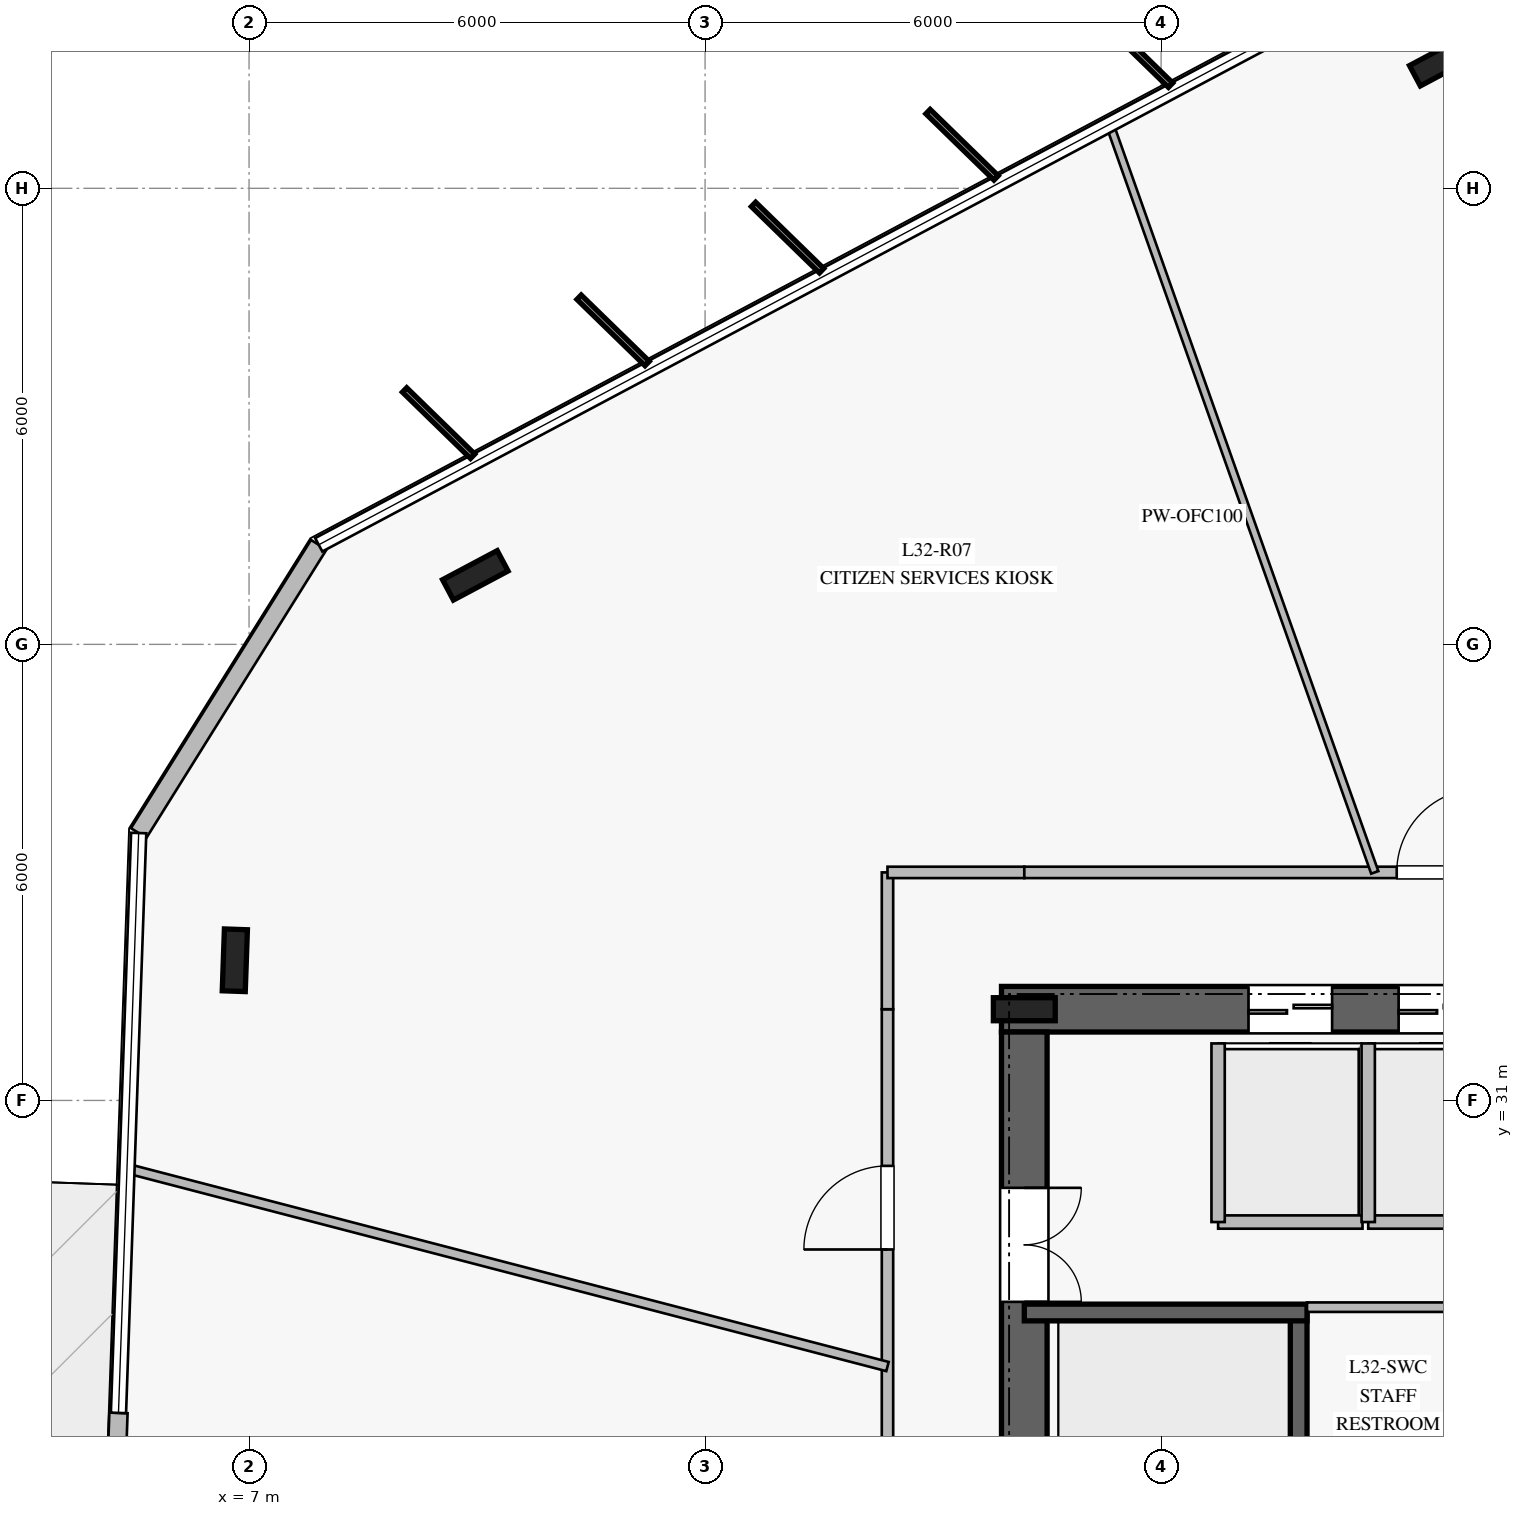
"""IFC4 building model, lengths in metres.
Left out: names, types, materials, properties, quantities, classifications, styles, units other than length and angle.
Written with IfcOpenShell. Run it as: python <this file> out.ifc"""

import sys

from ifc_helpers import new_model, si_unit, direction, frame, frame_2d, origin, origin_2d, place, context, subcontext, project, spatial, rectangle, i_section, extrude, element, fill, save


model = new_model("IFC4")
c1 = context("Model", 3, precision=1e-05, world=origin(), true_north=direction((0.0, 1.0)))
c2 = subcontext(c1, "Body", "Model", "MODEL_VIEW")
j1 = project(units=[si_unit("LENGTHUNIT", "METRE"), si_unit("PLANEANGLEUNIT", "RADIAN")], contexts=[c1])
p1 = place(None, origin())
s1 = spatial("IfcSite", under=j1, at=p1, CompositionType="ELEMENT")
p2 = place(p1, origin())
s2 = spatial("IfcBuilding", under=s1, at=p2, CompositionType="ELEMENT")
p3 = place(p2, frame((0.0, 0.0, 134.4)))
s3 = spatial("IfcBuildingStorey", under=s2, at=p3, CompositionType="ELEMENT", Elevation=134.4)
p4 = place(p3, frame((33.1, 32.2, 0.0), z_axis=(0.0, 0.0, 1.0), x_axis=(-1.0, 0.0, 0.0)))
e1 = element("IfcWall", 1, at=p4, inside=s3, PredefinedType="SHEAR", context=c2, shape_type="SweptSolid", body=[
    extrude(rectangle(XDim=16.2, YDim=0.6, at=frame_2d((8.1, 0.0))), origin(), (0.0, 0.0, 1.0), 3.76),
])
p5 = place(p4, frame((5.05, 0.0, 0.0)))
e2 = element("IfcOpeningElement", 2, at=p5, cuts=e1, PredefinedType="OPENING", context=c2, shape_type="SweptSolid", body=[
    extrude(rectangle(XDim=1.2, YDim=2.25, at=frame_2d((0.6, 1.125))), frame((0.0, 0.31, 0.0), z_axis=(0.0, -1.0, 0.0), x_axis=(1.0, 0.0, 0.0)), (0.0, 0.0, 1.0), 0.62),
])
p6 = place(p4, frame((11.85, 0.0, 0.0)))
e3 = element("IfcOpeningElement", 3, at=p6, cuts=e1, PredefinedType="OPENING", context=c2, shape_type="SweptSolid", body=[
    extrude(rectangle(XDim=1.1, YDim=2.2, at=frame_2d((0.55, 1.1))), frame((0.0, 0.31, 0.0), z_axis=(0.0, -1.0, 0.0), x_axis=(1.0, 0.0, 0.0)), (0.0, 0.0, 1.0), 0.62),
])
p7 = place(p4, frame((9.875, 0.0, 0.0)))
e4 = element("IfcOpeningElement", 4, at=p7, cuts=e1, PredefinedType="OPENING", context=c2, shape_type="SweptSolid", body=[
    extrude(rectangle(XDim=1.1, YDim=2.2, at=frame_2d((0.55, 1.1))), frame((0.0, 0.31, 0.0), z_axis=(0.0, -1.0, 0.0), x_axis=(1.0, 0.0, 0.0)), (0.0, 0.0, 1.0), 0.62),
])
p8 = place(p4, frame((7.9, 0.0, 0.0)))
e5 = element("IfcOpeningElement", 5, at=p8, cuts=e1, PredefinedType="OPENING", context=c2, shape_type="SweptSolid", body=[
    extrude(rectangle(XDim=1.1, YDim=2.2, at=frame_2d((0.55, 1.1))), frame((0.0, 0.31, 0.0), z_axis=(0.0, -1.0, 0.0), x_axis=(1.0, 0.0, 0.0)), (0.0, 0.0, 1.0), 0.62),
])
p9 = place(p3, frame((17.2, 31.9, 0.0), z_axis=(0.0, 0.0, 1.0), x_axis=(0.0, -1.0, 0.0)))
e6 = element("IfcWall", 6, at=p9, inside=s3, PredefinedType="SHEAR", context=c2, shape_type="SweptSolid", body=[
    extrude(rectangle(XDim=13.8, YDim=0.6, at=frame_2d((6.9, 0.0))), origin(), (0.0, 0.0, 1.0), 3.76),
])
p10 = place(p9, frame((2.05, 0.0, 0.0)))
e7 = element("IfcOpeningElement", 7, at=p10, cuts=e6, PredefinedType="OPENING", context=c2, shape_type="SweptSolid", body=[
    extrude(rectangle(XDim=1.5, YDim=2.2, at=frame_2d((0.75, 1.1))), frame((0.0, 0.31, 0.0), z_axis=(0.0, -1.0, 0.0), x_axis=(1.0, 0.0, 0.0)), (0.0, 0.0, 1.0), 0.62),
])
p11 = place(p3, frame((17.2, 32.2, 0.0), z_axis=(0.0, 0.0, 1.0), x_axis=(1.0, 0.0, 0.0)))
e8 = element("IfcColumn", 8, at=p11, inside=s3, PredefinedType="COLUMN", context=c2, shape_type="SweptSolid", body=[
    extrude(i_section(OverallWidth=0.303, OverallDepth=0.814, WebThickness=0.021, FlangeThickness=0.04, at=origin_2d()), origin(), (0.0, 0.0, 1.0), 4.0),
])
p12 = place(p3, frame((20.81, 20.99, 0.0), z_axis=(0.0, 0.0, 1.0), x_axis=(0.0, 1.0, 0.0)))
e9 = element("IfcWall", 9, at=p12, inside=s3, PredefinedType="SOLIDWALL", context=c2, shape_type="SweptSolid", body=[
    extrude(rectangle(XDim=7.22, YDim=0.22, at=frame_2d((3.61, 0.0))), origin(), (0.0, 0.0, 1.0), 3.76),
])
p13 = place(p12, frame((0.18, 0.0, 0.0)))
e10 = element("IfcOpeningElement", 10, at=p13, cuts=e9, PredefinedType="OPENING", context=c2, shape_type="SweptSolid", body=[
    extrude(rectangle(XDim=1.15, YDim=2.2, at=frame_2d((0.575, 1.1))), frame((0.0, 0.12, 0.0), z_axis=(0.0, -1.0, 0.0), x_axis=(1.0, 0.0, 0.0)), (0.0, 0.0, 1.0), 0.24),
])
p14 = place(p3, frame((17.2, 28.21, 0.0), z_axis=(0.0, 0.0, 1.0), x_axis=(1.0, 0.0, 0.0)))
e11 = element("IfcWall", 11, at=p14, inside=s3, PredefinedType="SOLIDWALL", context=c2, shape_type="SweptSolid", body=[
    extrude(rectangle(XDim=3.72, YDim=0.22, at=frame_2d((1.86, 0.0))), origin(), (0.0, 0.0, 1.0), 3.76),
])
for number, where, z_axis, x_axis in (
    (12, (22.699, 44.672, 0.0), (0.0, 0.0, 1.0), (0.883, 0.469, 0.0)),
    (13, (9.977, 37.908, 0.0), (0.0, 0.0, 1.0), (0.883, 0.469, 0.0)),
    (14, (6.813, 32.844, 0.0), (0.0, 0.0, 1.0), (0.035, 0.999, 0.0)),
):
    element("IfcColumn", number, at=place(p3, frame(where, z_axis=z_axis, x_axis=x_axis)), inside=s3, PredefinedType="COLUMN", context=c2, shape_type="SweptSolid", body=[
        extrude(i_section(OverallWidth=0.303, OverallDepth=0.814, WebThickness=0.021, FlangeThickness=0.04, at=origin_2d()), origin(), (0.0, 0.0, 1.0), 4.0),
    ])
p15 = place(p3, frame((7.917, 38.31, 0.0), z_axis=(0.0, 0.0, 1.0), x_axis=(-0.529822232534, -0.848108720573, 0.0)))
e15 = element("IfcWall", 15, at=p15, inside=s3, PredefinedType="STANDARD", context=c2, shape_type="SweptSolid", body=[
    extrude(rectangle(XDim=4.471, YDim=0.24, at=frame_2d((2.236, 0.0))), origin(), (0.0, 0.0, 1.0), 3.76),
])
p16 = place(p3, frame((5.282, 26.889, 0.0), z_axis=(0.0, 0.0, 1.0), x_axis=(-0.03498772474, -0.999387742129, 0.0)))
e16 = element("IfcWall", 16, at=p16, inside=s3, PredefinedType="STANDARD", context=c2, shape_type="SweptSolid", body=[
    extrude(rectangle(XDim=2.4, YDim=0.24, at=frame_2d((1.2, 0.0))), origin(), (0.0, 0.0, 1.0), 3.76),
])
p17 = place(p16, frame((0.4, 0.0, 0.0)))
e17 = element("IfcOpeningElement", 17, at=p17, cuts=e16, PredefinedType="OPENING", context=c2, shape_type="SweptSolid", body=[
    extrude(rectangle(XDim=1.6, YDim=2.25, at=frame_2d((0.8, 1.125))), frame((0.0, 0.13, 0.0), z_axis=(0.0, -1.0, 0.0), x_axis=(1.0, 0.0, 0.0)), (0.0, 0.0, 1.0), 0.26),
])
p18 = place(p3, frame((20.92, 28.28, 0.0), z_axis=(0.0, 0.0, 1.0), x_axis=(1.0, 0.0, 0.0)))
e18 = element("IfcWall", 18, at=p18, inside=s3, PredefinedType="PARTITIONING", context=c2, shape_type="SweptSolid", body=[
    extrude(rectangle(XDim=3.405, YDim=0.125, at=frame_2d((1.703, 0.0))), origin(), (0.0, 0.0, 1.0), 3.76),
])
p19 = place(p3, frame((19.75, 29.4, 0.0), z_axis=(0.0, 0.0, 1.0), x_axis=(1.0, 0.0, 0.0)))
e19 = element("IfcWall", 19, at=p19, inside=s3, PredefinedType="PARTITIONING", context=c2, shape_type="SweptSolid", body=[
    extrude(rectangle(XDim=1.9, YDim=0.175, at=frame_2d((0.95, 0.0))), origin(), (0.0, 0.0, 1.0), 3.76),
])
p20 = place(p3, frame((19.75, 29.4, 0.0), z_axis=(0.0, 0.0, 1.0), x_axis=(0.0, 1.0, 0.0)))
e20 = element("IfcWall", 20, at=p20, inside=s3, PredefinedType="PARTITIONING", context=c2, shape_type="SweptSolid", body=[
    extrude(rectangle(XDim=2.35, YDim=0.175, at=frame_2d((1.175, 0.0))), origin(), (0.0, 0.0, 1.0), 3.76),
])
p21 = place(p3, frame((21.725, 29.4, 0.0), z_axis=(0.0, 0.0, 1.0), x_axis=(1.0, 0.0, 0.0)))
e21 = element("IfcWall", 21, at=p21, inside=s3, PredefinedType="PARTITIONING", context=c2, shape_type="SweptSolid", body=[
    extrude(rectangle(XDim=1.9, YDim=0.175, at=frame_2d((0.95, 0.0))), origin(), (0.0, 0.0, 1.0), 3.76),
])
p22 = place(p3, frame((21.725, 29.4, 0.0), z_axis=(0.0, 0.0, 1.0), x_axis=(0.0, 1.0, 0.0)))
e22 = element("IfcWall", 22, at=p22, inside=s3, PredefinedType="PARTITIONING", context=c2, shape_type="SweptSolid", body=[
    extrude(rectangle(XDim=2.35, YDim=0.175, at=frame_2d((1.175, 0.0))), origin(), (0.0, 0.0, 1.0), 3.76),
])
p23 = place(p3, frame((15.4, 25.95, 0.0), z_axis=(0.0, 0.0, 1.0), x_axis=(0.0, 1.0, 0.0)))
e23 = element("IfcWall", 23, at=p23, inside=s3, PredefinedType="PARTITIONING", context=c2, shape_type="SweptSolid", body=[
    extrude(rectangle(XDim=6.25, YDim=0.15, at=frame_2d((3.125, 0.0))), origin(), (0.0, 0.0, 1.0), 3.21),
])
p24 = place(p23, frame((3.089, 0.0, 0.0)))
e24 = element("IfcOpeningElement", 24, at=p24, cuts=e23, PredefinedType="OPENING", context=c2, shape_type="SweptSolid", body=[
    extrude(rectangle(XDim=1.1, YDim=2.2, at=frame_2d((0.55, 1.1))), frame((0.0, 0.085, 0.0), z_axis=(0.0, -1.0, 0.0), x_axis=(1.0, 0.0, 0.0)), (0.0, 0.0, 1.0), 0.17),
])
p25 = place(p3, frame((15.4, 32.2, 0.0), z_axis=(0.0, 0.0, 1.0), x_axis=(0.0, 1.0, 0.0)))
e25 = element("IfcWall", 25, at=p25, inside=s3, PredefinedType="PARTITIONING", context=c2, shape_type="SweptSolid", body=[
    extrude(rectangle(XDim=1.8, YDim=0.15, at=frame_2d((0.9, 0.0))), origin(), (0.0, 0.0, 1.0), 3.21),
])
p26 = place(p3, frame((15.4, 34.0, 0.0), z_axis=(0.0, 0.0, 1.0), x_axis=(1.0, 0.0, 0.0)))
e26 = element("IfcWall", 26, at=p26, inside=s3, PredefinedType="PARTITIONING", context=c2, shape_type="SweptSolid", body=[
    extrude(rectangle(XDim=1.8, YDim=0.15, at=frame_2d((0.9, 0.0))), origin(), (0.0, 0.0, 1.0), 3.76),
])
p27 = place(p3, frame((17.2, 34.0, 0.0), z_axis=(0.0, 0.0, 1.0), x_axis=(1.0, 0.0, 0.0)))
e27 = element("IfcWall", 27, at=p27, inside=s3, PredefinedType="PARTITIONING", context=c2, shape_type="SweptSolid", body=[
    extrude(rectangle(XDim=6.85, YDim=0.15, at=frame_2d((3.425, 0.0))), origin(), (0.0, 0.0, 1.0), 3.21),
])
p28 = place(p27, frame((4.9, 0.0, 0.0)))
e28 = element("IfcOpeningElement", 28, at=p28, cuts=e27, PredefinedType="OPENING", context=c2, shape_type="SweptSolid", body=[
    extrude(rectangle(XDim=1.1, YDim=2.2, at=frame_2d((0.55, 1.1))), frame((0.0, 0.085, 0.0), z_axis=(0.0, -1.0, 0.0), x_axis=(1.0, 0.0, 0.0)), (0.0, 0.0, 1.0), 0.17),
])
p29 = place(p3, frame((21.811, 34.0, 0.0), z_axis=(0.0, 0.0, 1.0), x_axis=(-0.333981087617, 0.942579775464, 0.0)))
e29 = element("IfcWall", 29, at=p29, inside=s3, PredefinedType="MOVABLE", context=c2, shape_type="SweptSolid", body=[
    extrude(rectangle(XDim=10.426, YDim=0.1, at=frame_2d((5.213, 0.0))), origin(), (0.0, 0.0, 1.0), 3.05),
])
p30 = place(p3, frame((15.4, 27.499, 0.0), z_axis=(0.0, 0.0, 1.0), x_axis=(-0.96772970211, 0.251990522945, 0.0)))
e30 = element("IfcWall", 30, at=p30, inside=s3, PredefinedType="PARTITIONING", context=c2, shape_type="SweptSolid", body=[
    extrude(rectangle(XDim=10.322, YDim=0.125, at=frame_2d((5.161, 0.0))), origin(), (0.0, 0.0, 1.0), 3.16),
])
p31 = place(p10, origin())
e31 = element("IfcDoor", 31, at=p31, inside=s3, OperationType="DOUBLE_DOOR_SINGLE_SWING", PredefinedType="DOOR", context=c2, shape_type="SweptSolid", body=[
    extrude(rectangle(XDim=1.5, YDim=2.2, at=frame_2d((0.75, 1.1))), frame((0.0, 0.025, 0.0), z_axis=(0.0, -1.0, 0.0), x_axis=(1.0, 0.0, 0.0)), (0.0, 0.0, 1.0), 0.05),
])
fill(e7, e31)
p32 = place(p6, origin())
e32 = element("IfcDoor", 32, at=p32, inside=s3, OperationType="DOUBLE_DOOR_SLIDING", PredefinedType="DOOR", context=c2, shape_type="SweptSolid", body=[
    extrude(rectangle(XDim=1.1, YDim=2.2, at=frame_2d((0.55, 1.1))), frame((0.0, 0.025, 0.0), z_axis=(0.0, -1.0, 0.0), x_axis=(1.0, 0.0, 0.0)), (0.0, 0.0, 1.0), 0.05),
])
fill(e3, e32)
p33 = place(p7, origin())
e33 = element("IfcDoor", 33, at=p33, inside=s3, OperationType="DOUBLE_DOOR_SLIDING", PredefinedType="DOOR", context=c2, shape_type="SweptSolid", body=[
    extrude(rectangle(XDim=1.1, YDim=2.2, at=frame_2d((0.55, 1.1))), frame((0.0, 0.025, 0.0), z_axis=(0.0, -1.0, 0.0), x_axis=(1.0, 0.0, 0.0)), (0.0, 0.0, 1.0), 0.05),
])
fill(e4, e33)
p34 = place(p28, origin())
e34 = element("IfcDoor", 34, at=p34, inside=s3, OperationType="SINGLE_SWING_RIGHT", PredefinedType="DOOR", context=c2, shape_type="SweptSolid", body=[
    extrude(rectangle(XDim=1.1, YDim=2.2, at=frame_2d((0.55, 1.1))), frame((0.0, 0.025, 0.0), z_axis=(0.0, -1.0, 0.0), x_axis=(1.0, 0.0, 0.0)), (0.0, 0.0, 1.0), 0.05),
])
fill(e28, e34)
p35 = place(p24, origin())
e35 = element("IfcDoor", 35, at=p35, inside=s3, OperationType="SINGLE_SWING_LEFT", PredefinedType="DOOR", context=c2, shape_type="SweptSolid", body=[
    extrude(rectangle(XDim=1.1, YDim=2.2, at=frame_2d((0.55, 1.1))), frame((0.0, 0.025, 0.0), z_axis=(0.0, -1.0, 0.0), x_axis=(1.0, 0.0, 0.0)), (0.0, 0.0, 1.0), 0.05),
])
fill(e24, e35)
save(model, sys.argv[1])
